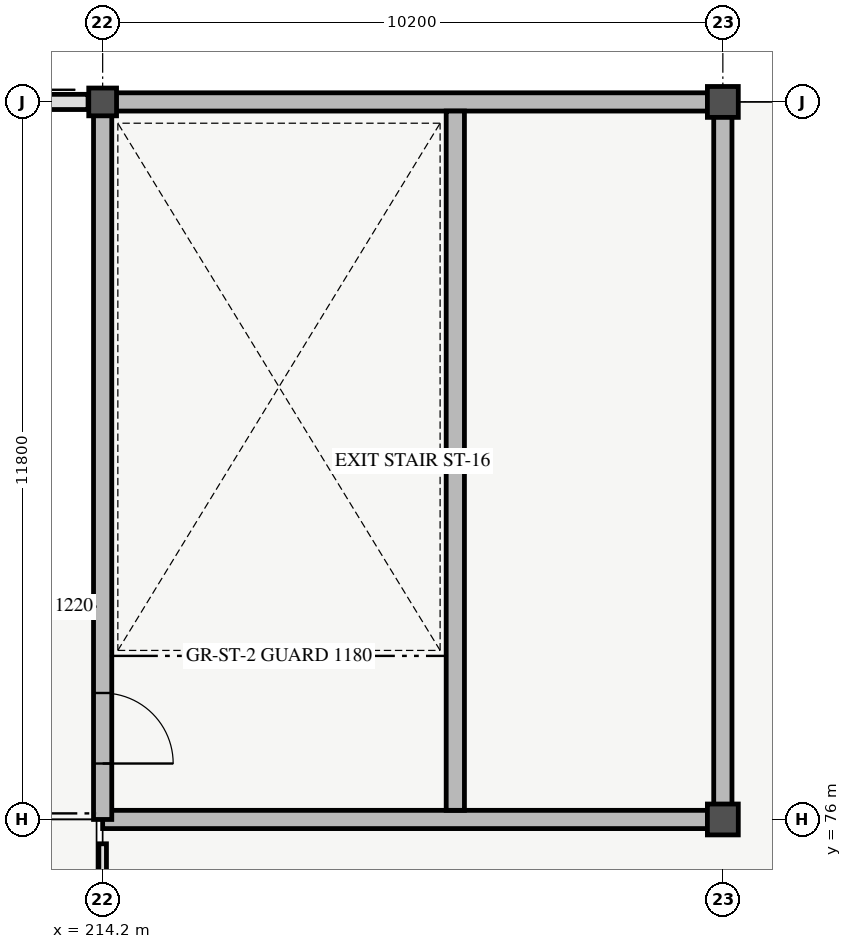
"""IFC4 building model, lengths in metres.
Left out: names, types, materials, properties, quantities, classifications, styles, units other than length and angle.
Written with IfcOpenShell. Run it as: python <this file> out.ifc"""

import sys

from ifc_helpers import new_model, si_unit, direction, frame, frame_2d, origin, origin_2d, place, context, subcontext, project, spatial, rectangle, hollow_circle, extrude, element, fill, save


model = new_model("IFC4")
c1 = context("Model", 3, precision=1e-05, world=origin(), true_north=direction((0.0, 1.0)))
c2 = subcontext(c1, "Body", "Model", "MODEL_VIEW")
j1 = project(units=[si_unit("LENGTHUNIT", "METRE"), si_unit("PLANEANGLEUNIT", "RADIAN")], contexts=[c1])
p1 = place(None, origin())
s1 = spatial("IfcSite", under=j1, at=p1, CompositionType="ELEMENT")
p2 = place(p1, origin())
s2 = spatial("IfcBuilding", under=s1, at=p2, CompositionType="ELEMENT")
p3 = place(p2, frame((0.0, 0.0, 10.8)))
s3 = spatial("IfcBuildingStorey", under=s2, at=p3, CompositionType="ELEMENT", Elevation=10.8)
p4 = place(p3, frame((214.2, 87.8, 0.0), z_axis=(0.0, 0.0, 1.0), x_axis=(1.0, 0.0, 0.0)))
e1 = element("IfcColumn", 1, at=p4, inside=s3, PredefinedType="COLUMN", context=c2, shape_type="SweptSolid", body=[
    extrude(hollow_circle(Radius=0.229, WallThickness=0.02, at=origin_2d()), origin(), (0.0, 0.0, 1.0), 4.2),
])
for number, where, z_axis, x_axis in (
    (2, (224.4, 76.0, 0.0), (0.0, 0.0, 1.0), (1.0, 0.0, 0.0)),
    (3, (224.4, 87.8, 0.0), (0.0, 0.0, 1.0), (1.0, 0.0, 0.0)),
):
    element("IfcColumn", number, at=place(p3, frame(where, z_axis=z_axis, x_axis=x_axis)), inside=s3, PredefinedType="COLUMN", context=c2, shape_type="SweptSolid", body=[
        extrude(hollow_circle(Radius=0.254, WallThickness=0.02, at=origin_2d()), origin(), (0.0, 0.0, 1.0), 4.2),
    ])
p5 = place(p3, frame((204.24, 87.8, 0.0), z_axis=(0.0, 0.0, 1.0), x_axis=(1.0, 0.0, 0.0)))
e4 = element("IfcWall", 4, at=p5, inside=s3, PredefinedType="SOLIDWALL", context=c2, shape_type="SweptSolid", body=[
    extrude(rectangle(XDim=9.72, YDim=0.25, at=frame_2d((4.86, 0.0))), origin(), (0.0, 0.0, 1.0), 3.06),
])
for number, where, z_axis, x_axis in (
    (5, (214.2, 76.0, 0.0), (0.0, 0.0, 1.0), (1.0, 0.0, 0.0)),
    (6, (214.2, 87.8, 0.0), (0.0, 0.0, 1.0), (1.0, 0.0, 0.0)),
):
    element("IfcWall", number, at=place(p3, frame(where, z_axis=z_axis, x_axis=x_axis)), inside=s3, PredefinedType="SHEAR", context=c2, shape_type="SweptSolid", body=[
        extrude(rectangle(XDim=10.2, YDim=0.3, at=frame_2d((5.1, 0.0))), origin(), (0.0, 0.0, 1.0), 4.2),
    ])
p6 = place(p3, frame((214.2, 76.0, 0.0), z_axis=(0.0, 0.0, 1.0), x_axis=(0.0, 1.0, 0.0)))
e7 = element("IfcWall", 7, at=p6, inside=s3, PredefinedType="SHEAR", context=c2, shape_type="SweptSolid", body=[
    extrude(rectangle(XDim=11.8, YDim=0.3, at=frame_2d((5.9, 0.0))), origin(), (0.0, 0.0, 1.0), 4.2),
])
p7 = place(p6, frame((0.92, 0.0, 0.0)))
e8 = element("IfcOpeningElement", 8, at=p7, cuts=e7, PredefinedType="OPENING", context=c2, shape_type="SweptSolid", body=[
    extrude(rectangle(XDim=1.16, YDim=2.2, at=frame_2d((0.58, 1.1))), frame((0.0, 0.16, 0.0), z_axis=(0.0, -1.0, 0.0), x_axis=(1.0, 0.0, 0.0)), (0.0, 0.0, 1.0), 0.32),
])
p8 = place(p3, frame((224.4, 76.0, 0.0), z_axis=(0.0, 0.0, 1.0), x_axis=(0.0, 1.0, 0.0)))
e9 = element("IfcWall", 9, at=p8, inside=s3, PredefinedType="SHEAR", context=c2, shape_type="SweptSolid", body=[
    extrude(rectangle(XDim=11.8, YDim=0.3, at=frame_2d((5.9, 0.0))), origin(), (0.0, 0.0, 1.0), 4.2),
])
p9 = place(p3, frame((220.0, 76.15, 0.0), z_axis=(0.0, 0.0, 1.0), x_axis=(0.0, 1.0, 0.0)))
e10 = element("IfcWall", 10, at=p9, inside=s3, PredefinedType="SHEAR", context=c2, shape_type="SweptSolid", body=[
    extrude(rectangle(XDim=11.5, YDim=0.3, at=frame_2d((5.75, 0.0))), origin(), (0.0, 0.0, 1.0), 4.2),
])
p10 = place(p3, frame((214.2, 64.6, 0.0), z_axis=(0.0, 0.0, 1.0), x_axis=(0.0, 1.0, 0.0)))
e11 = element("IfcWall", 11, at=p10, inside=s3, PredefinedType="PARTITIONING", context=c2, shape_type="SweptSolid", body=[
    extrude(rectangle(XDim=11.0, YDim=0.125, at=frame_2d((5.5, 0.0))), origin(), (0.0, 0.0, 1.0), 3.06),
])
p11 = place(p10, frame((4.975, 0.0, 0.0)))
e12 = element("IfcOpeningElement", 12, at=p11, cuts=e11, PredefinedType="OPENING", context=c2, shape_type="SweptSolid", body=[
    extrude(rectangle(XDim=1.05, YDim=2.15, at=frame_2d((0.525, 1.075))), frame((0.0, 0.073, 0.0), z_axis=(0.0, -1.0, 0.0), x_axis=(1.0, 0.0, 0.0)), (0.0, 0.0, 1.0), 0.145),
])
p12 = place(p7, origin())
e13 = element("IfcDoor", 13, at=p12, inside=s3, OperationType="SINGLE_SWING_LEFT", PredefinedType="DOOR", context=c2, shape_type="SweptSolid", body=[
    extrude(rectangle(XDim=1.16, YDim=2.2, at=frame_2d((0.58, 1.1))), frame((0.0, 0.025, 0.0), z_axis=(0.0, -1.0, 0.0), x_axis=(1.0, 0.0, 0.0)), (0.0, 0.0, 1.0), 0.05),
])
fill(e8, e13)
save(model, sys.argv[1])
